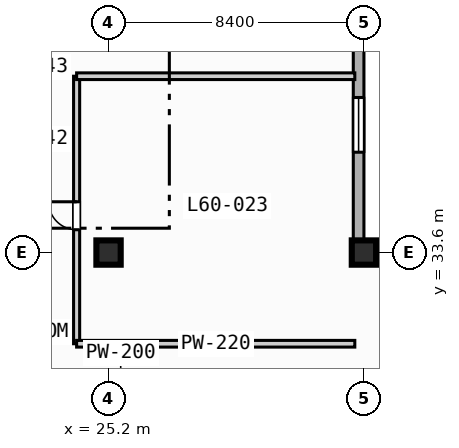
"""IFC4 building model, lengths in metres.
Left out: names, types, materials, properties, quantities, classifications, styles, units other than length and angle.
Written with IfcOpenShell. Run it as: python <this file> out.ifc"""

import sys

from ifc_helpers import new_model, si_unit, direction, frame, frame_2d, origin, origin_2d, place, context, subcontext, project, spatial, rectangle, extrude, element, fill, save


model = new_model("IFC4")
c1 = context("Model", 3, precision=1e-05, world=origin(), true_north=direction((0.0, 1.0)))
c2 = subcontext(c1, "Body", "Model", "MODEL_VIEW")
j1 = project(units=[si_unit("LENGTHUNIT", "METRE"), si_unit("PLANEANGLEUNIT", "RADIAN")], contexts=[c1])
p1 = place(None, origin())
s1 = spatial("IfcSite", under=j1, at=p1, CompositionType="ELEMENT")
p2 = place(p1, origin())
s2 = spatial("IfcBuilding", under=s1, at=p2, CompositionType="ELEMENT")
p3 = place(p2, frame((0.0, 0.0, 245.3)))
s3 = spatial("IfcBuildingStorey", under=s2, at=p3, CompositionType="ELEMENT", Elevation=245.3)
for number, where, z_axis, x_axis in (
    (1, (25.2, 33.6, 0.0), (0.0, 0.0, 1.0), (1.0, 0.0, 0.0)),
    (2, (33.6, 33.6, 0.0), (0.0, 0.0, 1.0), (1.0, 0.0, 0.0)),
):
    element("IfcColumn", number, at=place(p3, frame(where, z_axis=z_axis, x_axis=x_axis)), inside=s3, PredefinedType="COLUMN", context=c2, shape_type="SweptSolid", body=[
        extrude(rectangle(XDim=0.8, YDim=0.8, at=origin_2d()), origin(), (0.0, 0.0, 1.0), 3.7),
    ])
p4 = place(p3, frame((33.425, 72.425, 0.0), z_axis=(0.0, 0.0, 1.0), x_axis=(0.0, -1.0, 0.0)))
e3 = element("IfcWall", 3, at=p4, inside=s3, PredefinedType="STANDARD", context=c2, shape_type="SweptSolid", body=[
    extrude(rectangle(XDim=39.0, YDim=0.35, at=frame_2d((19.5, 0.0))), origin(), (0.0, 0.0, 1.0), 3.47),
])
p5 = place(p4, frame((33.725, 0.0, 0.85)))
e4 = element("IfcOpeningElement", 4, at=p5, cuts=e3, PredefinedType="OPENING", context=c2, shape_type="SweptSolid", body=[
    extrude(rectangle(XDim=1.8, YDim=1.8, at=frame_2d((0.9, 0.9))), frame((0.0, 0.185, 0.0), z_axis=(0.0, -1.0, 0.0), x_axis=(1.0, 0.0, 0.0)), (0.0, 0.0, 1.0), 0.37),
])
p6 = place(p4, frame((8.225, 0.0, 0.85)))
e5 = element("IfcOpeningElement", 5, at=p6, cuts=e3, PredefinedType="OPENING", context=c2, shape_type="SweptSolid", body=[
    extrude(rectangle(XDim=2.4, YDim=1.95, at=frame_2d((1.2, 0.975))), frame((0.0, 0.185, 0.0), z_axis=(0.0, -1.0, 0.0), x_axis=(1.0, 0.0, 0.0)), (0.0, 0.0, 1.0), 0.37),
])
p7 = place(p3, frame((33.425, 33.425, 0.0), z_axis=(0.0, 0.0, 1.0), x_axis=(1.0, 0.0, 0.0)))
e6 = element("IfcWall", 6, at=p7, inside=s3, PredefinedType="STANDARD", context=c2, shape_type="SweptSolid", body=[
    extrude(rectangle(XDim=39.0, YDim=0.35, at=frame_2d((19.5, 0.0))), origin(), (0.0, 0.0, 1.0), 3.47),
])
p8 = place(p7, frame((12.075, 0.0, 0.0)))
e7 = element("IfcOpeningElement", 7, at=p8, cuts=e6, PredefinedType="OPENING", context=c2, shape_type="SweptSolid", body=[
    extrude(rectangle(XDim=1.4, YDim=2.2, at=frame_2d((0.7, 1.1))), frame((0.0, 0.185, 0.0), z_axis=(0.0, -1.0, 0.0), x_axis=(1.0, 0.0, 0.0)), (0.0, 0.0, 1.0), 0.37),
])
p9 = place(p3, frame((24.15, 30.6, 0.0), z_axis=(0.0, 0.0, 1.0), x_axis=(0.0, 1.0, 0.0)))
e8 = element("IfcWall", 8, at=p9, inside=s3, PredefinedType="PARTITIONING", context=c2, shape_type="SweptSolid", body=[
    extrude(rectangle(XDim=8.8, YDim=0.2, at=frame_2d((4.4, 0.0))), origin(), (0.0, 0.0, 1.0), 3.47),
])
p10 = place(p9, frame((3.75, 0.0, 0.0)))
e9 = element("IfcOpeningElement", 9, at=p10, cuts=e8, PredefinedType="OPENING", context=c2, shape_type="SweptSolid", body=[
    extrude(rectangle(XDim=0.92, YDim=2.1, at=frame_2d((0.46, 1.05))), frame((0.0, 0.11, 0.0), z_axis=(0.0, -1.0, 0.0), x_axis=(1.0, 0.0, 0.0)), (0.0, 0.0, 1.0), 0.22),
])
for number, where, z_axis, x_axis in (
    (10, (24.15, 30.6, 0.0), (0.0, 0.0, 1.0), (1.0, 0.0, 0.0)),
    (11, (24.15, 39.4, 0.0), (0.0, 0.0, 1.0), (1.0, 0.0, 0.0)),
):
    element("IfcWall", number, at=place(p3, frame(where, z_axis=z_axis, x_axis=x_axis)), inside=s3, PredefinedType="PARTITIONING", context=c2, shape_type="SweptSolid", body=[
        extrude(rectangle(XDim=9.15, YDim=0.22, at=frame_2d((4.575, 0.0))), origin(), (0.0, 0.0, 1.0), 3.47),
    ])
p11 = place(p5, origin())
e12 = element("IfcWindow", 12, at=p11, inside=s3, PartitioningType="SINGLE_PANEL", PredefinedType="WINDOW", context=c2, shape_type="SweptSolid", body=[
    extrude(rectangle(XDim=1.8, YDim=1.8, at=frame_2d((0.9, 0.9))), frame((0.0, 0.03, 0.0), z_axis=(0.0, -1.0, 0.0), x_axis=(1.0, 0.0, 0.0)), (0.0, 0.0, 1.0), 0.06),
])
fill(e4, e12)
p12 = place(p10, origin())
e13 = element("IfcDoor", 13, at=p12, inside=s3, OperationType="SINGLE_SWING_RIGHT", PredefinedType="DOOR", context=c2, shape_type="SweptSolid", body=[
    extrude(rectangle(XDim=0.92, YDim=2.1, at=frame_2d((0.46, 1.05))), frame((0.0, 0.025, 0.0), z_axis=(0.0, -1.0, 0.0), x_axis=(1.0, 0.0, 0.0)), (0.0, 0.0, 1.0), 0.05),
])
fill(e9, e13)
save(model, sys.argv[1])
